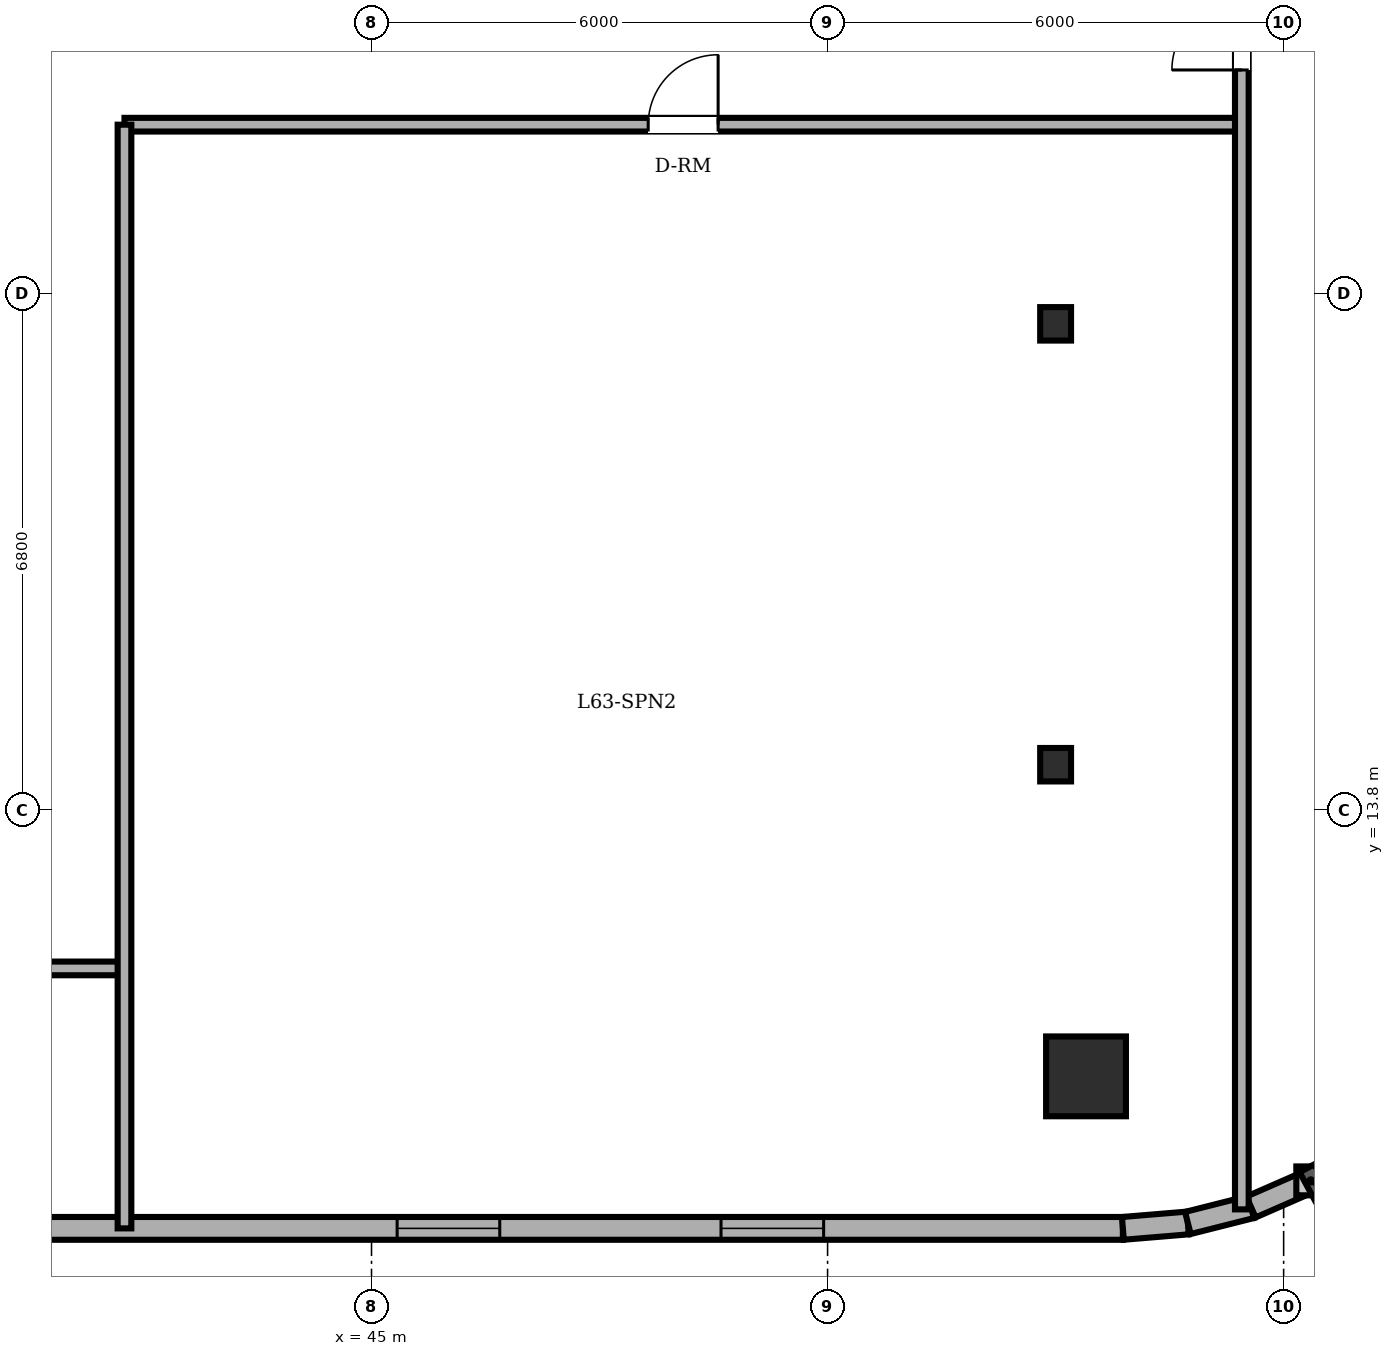
"""IFC4 building model, lengths in metres.
Left out: names, types, materials, properties, quantities, classifications, styles, units other than length and angle.
Written with IfcOpenShell. Run it as: python <this file> out.ifc"""

import sys

from ifc_helpers import new_model, si_unit, direction, frame, frame_2d, origin, origin_2d, place, context, subcontext, project, spatial, rectangle, circle, i_section, extrude, element, fill, save


model = new_model("IFC4")
c1 = context("Model", 3, precision=1e-05, world=origin(), true_north=direction((0.0, 1.0)))
c2 = subcontext(c1, "Body", "Model", "MODEL_VIEW")
j1 = project(units=[si_unit("LENGTHUNIT", "METRE"), si_unit("PLANEANGLEUNIT", "RADIAN")], contexts=[c1])
p1 = place(None, origin())
s1 = spatial("IfcSite", under=j1, at=p1, CompositionType="ELEMENT")
p2 = place(p1, origin())
s2 = spatial("IfcBuilding", under=s1, at=p2, CompositionType="ELEMENT")
p3 = place(p2, frame((0.0, 0.0, 240.9)))
s3 = spatial("IfcBuildingStorey", under=s2, at=p3, CompositionType="ELEMENT", Elevation=240.9)
p4 = place(p3, frame((54.4, 10.3, 0.0), z_axis=(0.0, 0.0, 1.0), x_axis=(1.0, 0.0, 0.0)))
e1 = element("IfcColumn", 1, at=p4, inside=s3, PredefinedType="COLUMN", context=c2, shape_type="SweptSolid", body=[
    extrude(circle(Radius=0.525, at=origin_2d()), origin(), (0.0, 0.0, 1.0), 3.6),
])
for number, where, z_axis, x_axis in (
    (2, (54.0, 14.4, 0.0), (0.0, 0.0, 1.0), (1.0, 0.0, 0.0)),
    (3, (54.0, 20.2, 0.0), (0.0, 0.0, 1.0), (1.0, 0.0, 0.0)),
):
    element("IfcColumn", number, at=place(p3, frame(where, z_axis=z_axis, x_axis=x_axis)), inside=s3, PredefinedType="COLUMN", context=c2, shape_type="SweptSolid", body=[
        extrude(i_section(OverallWidth=0.406, OverallDepth=0.44, WebThickness=0.024, FlangeThickness=0.039, FilletRadius=0.015, at=origin_2d()), origin(), (0.0, 0.0, 1.0), 3.6),
    ])
p5 = place(p3, frame((22.4, 8.3, 0.0), z_axis=(0.0, 0.0, 1.0), x_axis=(1.0, 0.0, 0.0)))
e4 = element("IfcWall", 4, at=p5, inside=s3, PredefinedType="SOLIDWALL", context=c2, shape_type="SweptSolid", body=[
    extrude(rectangle(XDim=32.485, YDim=0.3, at=frame_2d((16.243, 0.0))), origin(), (0.0, 0.0, 1.0), 3.4),
])
p6 = place(p5, frame((4.825, 0.0, 0.0)))
e5 = element("IfcOpeningElement", 5, at=p6, cuts=e4, PredefinedType="OPENING", context=c2, shape_type="SweptSolid", body=[
    extrude(rectangle(XDim=0.95, YDim=2.2, at=frame_2d((0.475, 1.1))), frame((0.0, 0.16, 0.0), z_axis=(0.0, -1.0, 0.0), x_axis=(1.0, 0.0, 0.0)), (0.0, 0.0, 1.0), 0.32),
])
p7 = place(p5, frame((1.3, 0.0, 0.85)))
e6 = element("IfcOpeningElement", 6, at=p7, cuts=e4, PredefinedType="OPENING", context=c2, shape_type="SweptSolid", body=[
    extrude(rectangle(XDim=1.35, YDim=1.55, at=frame_2d((0.675, 0.775))), frame((0.0, 0.16, 0.0), z_axis=(0.0, -1.0, 0.0), x_axis=(1.0, 0.0, 0.0)), (0.0, 0.0, 1.0), 0.32),
])
p8 = place(p5, frame((10.708, 0.0, 0.85)))
e7 = element("IfcOpeningElement", 7, at=p8, cuts=e4, PredefinedType="OPENING", context=c2, shape_type="SweptSolid", body=[
    extrude(rectangle(XDim=1.35, YDim=1.55, at=frame_2d((0.675, 0.775))), frame((0.0, 0.16, 0.0), z_axis=(0.0, -1.0, 0.0), x_axis=(1.0, 0.0, 0.0)), (0.0, 0.0, 1.0), 0.32),
])
p9 = place(p5, frame((14.692, 0.0, 0.85)))
e8 = element("IfcOpeningElement", 8, at=p9, cuts=e4, PredefinedType="OPENING", context=c2, shape_type="SweptSolid", body=[
    extrude(rectangle(XDim=1.35, YDim=1.55, at=frame_2d((0.675, 0.775))), frame((0.0, 0.16, 0.0), z_axis=(0.0, -1.0, 0.0), x_axis=(1.0, 0.0, 0.0)), (0.0, 0.0, 1.0), 0.32),
])
p10 = place(p5, frame((22.937, 0.0, 0.85)))
e9 = element("IfcOpeningElement", 9, at=p10, cuts=e4, PredefinedType="OPENING", context=c2, shape_type="SweptSolid", body=[
    extrude(rectangle(XDim=1.35, YDim=1.55, at=frame_2d((0.675, 0.775))), frame((0.0, 0.16, 0.0), z_axis=(0.0, -1.0, 0.0), x_axis=(1.0, 0.0, 0.0)), (0.0, 0.0, 1.0), 0.32),
])
p11 = place(p5, frame((27.198, 0.0, 0.85)))
e10 = element("IfcOpeningElement", 10, at=p11, cuts=e4, PredefinedType="OPENING", context=c2, shape_type="SweptSolid", body=[
    extrude(rectangle(XDim=1.35, YDim=1.55, at=frame_2d((0.675, 0.775))), frame((0.0, 0.16, 0.0), z_axis=(0.0, -1.0, 0.0), x_axis=(1.0, 0.0, 0.0)), (0.0, 0.0, 1.0), 0.32),
])
p12 = place(p3, frame((54.885, 8.3, 0.0), z_axis=(0.0, 0.0, 1.0), x_axis=(0.996565355958, 0.082809971041, 0.0)))
e11 = element("IfcWall", 11, at=p12, inside=s3, PredefinedType="SOLIDWALL", context=c2, shape_type="SweptSolid", body=[
    extrude(rectangle(XDim=0.858, YDim=0.3, at=frame_2d((0.429, 0.0))), origin(), (0.0, 0.0, 1.0), 3.4),
])
p13 = place(p3, frame((55.74, 8.371, 0.0), z_axis=(0.0, 0.0, 1.0), x_axis=(0.969536346338, 0.244947490555, 0.0)))
e12 = element("IfcWall", 12, at=p13, inside=s3, PredefinedType="SOLIDWALL", context=c2, shape_type="SweptSolid", body=[
    extrude(rectangle(XDim=0.857, YDim=0.3, at=frame_2d((0.429, 0.0))), origin(), (0.0, 0.0, 1.0), 3.4),
])
p14 = place(p3, frame((56.571, 8.581, 0.0), z_axis=(0.0, 0.0, 1.0), x_axis=(0.916085473636, 0.400983048261, 0.0)))
e13 = element("IfcWall", 13, at=p14, inside=s3, PredefinedType="SOLIDWALL", context=c2, shape_type="SweptSolid", body=[
    extrude(rectangle(XDim=0.858, YDim=0.3, at=frame_2d((0.429, 0.0))), origin(), (0.0, 0.0, 1.0), 3.4),
])
p15 = place(p3, frame((17.677, 11.72, 0.0), z_axis=(0.0, 0.0, 1.0), x_axis=(1.0, 0.0, 0.0)))
e14 = element("IfcWall", 14, at=p15, inside=s3, PredefinedType="PARTITIONING", context=c2, shape_type="SweptSolid", body=[
    extrude(rectangle(XDim=24.073, YDim=0.18, at=frame_2d((12.037, 0.0))), origin(), (0.0, 0.0, 1.0), 3.4),
])
p16 = place(p15, frame((9.763, 0.0, 0.0)))
e15 = element("IfcOpeningElement", 15, at=p16, cuts=e14, PredefinedType="OPENING", context=c2, shape_type="SweptSolid", body=[
    extrude(rectangle(XDim=0.92, YDim=2.1, at=frame_2d((0.46, 1.05))), frame((0.0, 0.1, 0.0), z_axis=(0.0, -1.0, 0.0), x_axis=(1.0, 0.0, 0.0)), (0.0, 0.0, 1.0), 0.2),
])
p17 = place(p15, frame((4.063, 0.0, 0.0)))
e16 = element("IfcOpeningElement", 16, at=p17, cuts=e14, PredefinedType="OPENING", context=c2, shape_type="SweptSolid", body=[
    extrude(rectangle(XDim=0.92, YDim=2.1, at=frame_2d((0.46, 1.05))), frame((0.0, 0.1, 0.0), z_axis=(0.0, -1.0, 0.0), x_axis=(1.0, 0.0, 0.0)), (0.0, 0.0, 1.0), 0.2),
])
p18 = place(p15, frame((17.378, 0.0, 0.0)))
e17 = element("IfcOpeningElement", 17, at=p18, cuts=e14, PredefinedType="OPENING", context=c2, shape_type="SweptSolid", body=[
    extrude(rectangle(XDim=0.92, YDim=2.1, at=frame_2d((0.46, 1.05))), frame((0.0, 0.1, 0.0), z_axis=(0.0, -1.0, 0.0), x_axis=(1.0, 0.0, 0.0)), (0.0, 0.0, 1.0), 0.2),
])
p19 = place(p3, frame((41.75, 22.82, 0.0), z_axis=(0.0, 0.0, 1.0), x_axis=(1.0, 0.0, 0.0)))
e18 = element("IfcWall", 18, at=p19, inside=s3, PredefinedType="PARTITIONING", context=c2, shape_type="SweptSolid", body=[
    extrude(rectangle(XDim=14.7, YDim=0.18, at=frame_2d((7.35, 0.0))), origin(), (0.0, 0.0, 1.0), 3.4),
])
p20 = place(p19, frame((6.89, 0.0, 0.0)))
e19 = element("IfcOpeningElement", 19, at=p20, cuts=e18, PredefinedType="OPENING", context=c2, shape_type="SweptSolid", body=[
    extrude(rectangle(XDim=0.92, YDim=2.1, at=frame_2d((0.46, 1.05))), frame((0.0, 0.1, 0.0), z_axis=(0.0, -1.0, 0.0), x_axis=(1.0, 0.0, 0.0)), (0.0, 0.0, 1.0), 0.2),
])
p21 = place(p3, frame((41.75, 8.3, 0.0), z_axis=(0.0, 0.0, 1.0), x_axis=(0.0, 1.0, 0.0)))
e20 = element("IfcWall", 20, at=p21, inside=s3, PredefinedType="PARTITIONING", context=c2, shape_type="SweptSolid", body=[
    extrude(rectangle(XDim=14.52, YDim=0.18, at=frame_2d((7.26, 0.0))), origin(), (0.0, 0.0, 1.0), 3.4),
])
p22 = place(p3, frame((56.45, 8.55, 0.0), z_axis=(0.0, 0.0, 1.0), x_axis=(0.0, 1.0, 0.0)))
e21 = element("IfcWall", 21, at=p22, inside=s3, PredefinedType="PARTITIONING", context=c2, shape_type="SweptSolid", body=[
    extrude(rectangle(XDim=30.9, YDim=0.18, at=frame_2d((15.45, 0.0))), origin(), (0.0, 0.0, 1.0), 3.4),
])
p23 = place(p22, frame((14.99, 0.0, 0.0)))
e22 = element("IfcOpeningElement", 22, at=p23, cuts=e21, PredefinedType="OPENING", context=c2, shape_type="SweptSolid", body=[
    extrude(rectangle(XDim=0.92, YDim=2.1, at=frame_2d((0.46, 1.05))), frame((0.0, 0.1, 0.0), z_axis=(0.0, -1.0, 0.0), x_axis=(1.0, 0.0, 0.0)), (0.0, 0.0, 1.0), 0.2),
])
p24 = place(p10, origin())
e23 = element("IfcWindow", 23, at=p24, inside=s3, PartitioningType="SINGLE_PANEL", PredefinedType="WINDOW", context=c2, shape_type="SweptSolid", body=[
    extrude(rectangle(XDim=1.35, YDim=1.55, at=frame_2d((0.675, 0.775))), frame((0.0, 0.03, 0.0), z_axis=(0.0, -1.0, 0.0), x_axis=(1.0, 0.0, 0.0)), (0.0, 0.0, 1.0), 0.06),
])
fill(e9, e23)
p25 = place(p11, origin())
e24 = element("IfcWindow", 24, at=p25, inside=s3, PartitioningType="SINGLE_PANEL", PredefinedType="WINDOW", context=c2, shape_type="SweptSolid", body=[
    extrude(rectangle(XDim=1.35, YDim=1.55, at=frame_2d((0.675, 0.775))), frame((0.0, 0.03, 0.0), z_axis=(0.0, -1.0, 0.0), x_axis=(1.0, 0.0, 0.0)), (0.0, 0.0, 1.0), 0.06),
])
fill(e10, e24)
p26 = place(p20, origin())
e25 = element("IfcDoor", 25, at=p26, inside=s3, OperationType="SINGLE_SWING_RIGHT", PredefinedType="DOOR", context=c2, shape_type="SweptSolid", body=[
    extrude(rectangle(XDim=0.92, YDim=2.1, at=frame_2d((0.46, 1.05))), frame((0.0, 0.025, 0.0), z_axis=(0.0, -1.0, 0.0), x_axis=(1.0, 0.0, 0.0)), (0.0, 0.0, 1.0), 0.05),
])
fill(e19, e25)
p27 = place(p23, origin())
e26 = element("IfcDoor", 26, at=p27, inside=s3, OperationType="SINGLE_SWING_LEFT", PredefinedType="DOOR", context=c2, shape_type="SweptSolid", body=[
    extrude(rectangle(XDim=0.92, YDim=2.1, at=frame_2d((0.46, 1.05))), frame((0.0, 0.025, 0.0), z_axis=(0.0, -1.0, 0.0), x_axis=(1.0, 0.0, 0.0)), (0.0, 0.0, 1.0), 0.05),
])
fill(e22, e26)
save(model, sys.argv[1])
